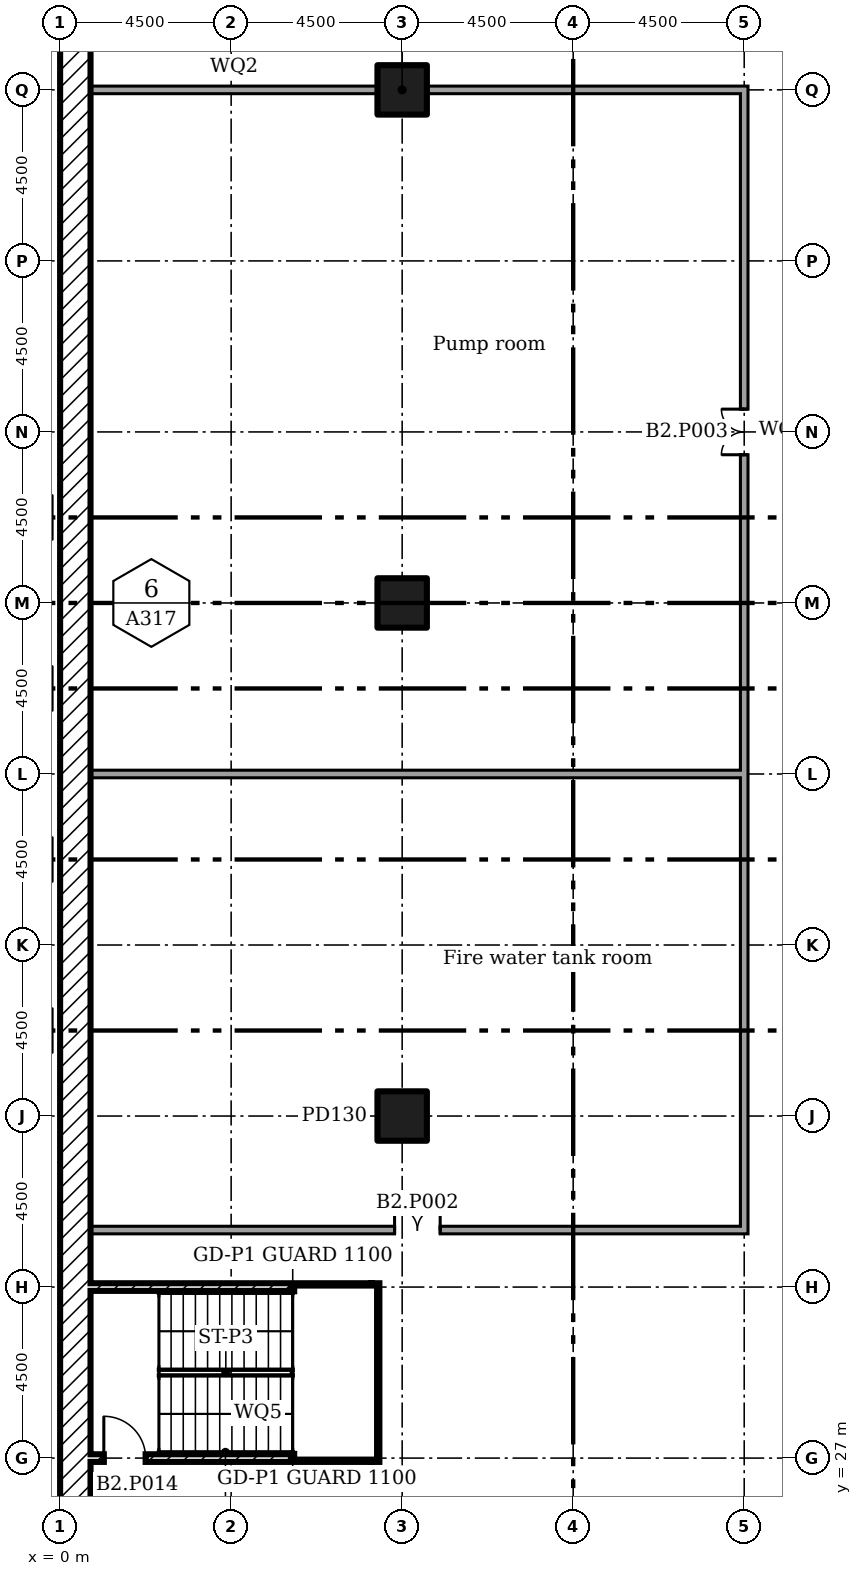
"""IFC4 building model, lengths in metres.
Left out: names, types, materials, properties, quantities, classifications, styles, units other than length and angle.
Written with IfcOpenShell. Run it as: python <this file> out.ifc"""

import sys

from ifc_helpers import new_model, si_unit, direction, frame, frame_2d, origin, origin_2d, place, context, subcontext, project, spatial, rectangle, extrude, element, fill, save


model = new_model("IFC4")
c1 = context("Model", 3, precision=1e-05, world=origin(), true_north=direction((0.0, 1.0)))
c2 = subcontext(c1, "Body", "Model", "MODEL_VIEW")
j1 = project(units=[si_unit("LENGTHUNIT", "METRE"), si_unit("PLANEANGLEUNIT", "RADIAN")], contexts=[c1])
p1 = place(None, origin())
s1 = spatial("IfcSite", under=j1, at=p1, CompositionType="ELEMENT")
p2 = place(p1, origin())
s2 = spatial("IfcBuilding", under=s1, at=p2, CompositionType="ELEMENT")
p3 = place(p2, frame((0.0, 0.0, -8.0)))
s3 = spatial("IfcBuildingStorey", under=s2, at=p3, CompositionType="ELEMENT", Elevation=-8.0)
for number, where in (
    (1, (9.0, 36.0, 0.0)),
    (2, (9.0, 49.5, 0.0)),
    (3, (9.0, 63.0, 0.0)),
):
    element("IfcColumn", number, at=place(p3, frame(where)), inside=s3, PredefinedType="COLUMN", context=c2, shape_type="SweptSolid", body=[
        extrude(rectangle(XDim=1.3, YDim=1.3, at=origin_2d()), origin(), (0.0, 0.0, 1.0), 4.0),
    ])
p4 = place(p3, frame((0.4, 0.8, 0.0), z_axis=(0.0, 0.0, 1.0), x_axis=(0.0, 1.0, 0.0)))
e4 = element("IfcWall", 4, at=p4, inside=s3, PredefinedType="SOLIDWALL", context=c2, shape_type="SweptSolid", body=[
    extrude(rectangle(XDim=97.4, YDim=0.8, at=frame_2d((48.7, 0.0))), origin(), (0.0, 0.0, 1.0), 4.0),
])
p5 = place(p3, frame((0.8, 45.0, 0.0)))
e5 = element("IfcWall", 5, at=p5, inside=s3, PredefinedType="SOLIDWALL", context=c2, shape_type="SweptSolid", body=[
    extrude(rectangle(XDim=17.3, YDim=0.2, at=frame_2d((8.65, 0.0))), origin(), (0.0, 0.0, 1.0), 3.55),
])
p6 = place(p3, frame((18.0, 32.9, 0.0), z_axis=(0.0, 0.0, 1.0), x_axis=(0.0, 1.0, 0.0)))
e6 = element("IfcWall", 6, at=p6, inside=s3, PredefinedType="SOLIDWALL", context=c2, shape_type="SweptSolid", body=[
    extrude(rectangle(XDim=12.0, YDim=0.2, at=frame_2d((6.0, 0.0))), origin(), (0.0, 0.0, 1.0), 3.55),
])
p7 = place(p3, frame((0.8, 33.0, 0.0)))
e7 = element("IfcWall", 7, at=p7, inside=s3, PredefinedType="SOLIDWALL", context=c2, shape_type="SweptSolid", body=[
    extrude(rectangle(XDim=17.1, YDim=0.2, at=frame_2d((8.55, 0.0))), origin(), (0.0, 0.0, 1.0), 3.55),
])
p8 = place(p7, frame((8.0, 0.0, 0.0)))
e8 = element("IfcOpeningElement", 8, at=p8, cuts=e7, PredefinedType="OPENING", context=c2, shape_type="SweptSolid", body=[
    extrude(rectangle(XDim=1.2, YDim=2.1, at=frame_2d((0.6, 1.05))), frame((0.0, 0.11, 0.0), z_axis=(0.0, -1.0, 0.0), x_axis=(1.0, 0.0, 0.0)), (0.0, 0.0, 1.0), 0.22),
])
p9 = place(p3, frame((18.0, 45.0, 0.0), z_axis=(0.0, 0.0, 1.0), x_axis=(0.0, 1.0, 0.0)))
e9 = element("IfcWall", 9, at=p9, inside=s3, PredefinedType="SOLIDWALL", context=c2, shape_type="SweptSolid", body=[
    extrude(rectangle(XDim=18.1, YDim=0.2, at=frame_2d((9.05, 0.0))), origin(), (0.0, 0.0, 1.0), 3.55),
])
p10 = place(p9, frame((8.4, 0.0, 0.0)))
e10 = element("IfcOpeningElement", 10, at=p10, cuts=e9, PredefinedType="OPENING", context=c2, shape_type="SweptSolid", body=[
    extrude(rectangle(XDim=1.2, YDim=2.1, at=frame_2d((0.6, 1.05))), frame((0.0, 0.11, 0.0), z_axis=(0.0, -1.0, 0.0), x_axis=(1.0, 0.0, 0.0)), (0.0, 0.0, 1.0), 0.22),
])
p11 = place(p3, frame((0.8, 63.0, 0.0)))
e11 = element("IfcWall", 11, at=p11, inside=s3, PredefinedType="SOLIDWALL", context=c2, shape_type="SweptSolid", body=[
    extrude(rectangle(XDim=7.555, YDim=0.2, at=frame_2d((3.777, 0.0))), origin(), (0.0, 0.0, 1.0), 3.55),
])
p12 = place(p3, frame((9.645, 63.0, 0.0)))
e12 = element("IfcWall", 12, at=p12, inside=s3, PredefinedType="SOLIDWALL", context=c2, shape_type="SweptSolid", body=[
    extrude(rectangle(XDim=8.255, YDim=0.2, at=frame_2d((4.127, 0.0))), origin(), (0.0, 0.0, 1.0), 3.55),
])
p13 = place(p3, frame((8.3, 26.9, 0.0), z_axis=(0.0, 0.0, 1.0), x_axis=(0.0, 1.0, 0.0)))
e13 = element("IfcWall", 13, at=p13, inside=s3, PredefinedType="SOLIDWALL", context=c2, shape_type="SweptSolid", body=[
    extrude(rectangle(XDim=4.7, YDim=0.2, at=frame_2d((2.35, 0.0))), origin(), (0.0, 0.0, 1.0), 3.55),
])
p14 = place(p3, frame((0.8, 27.0, 0.0)))
e14 = element("IfcWall", 14, at=p14, inside=s3, PredefinedType="SOLIDWALL", context=c2, shape_type="SweptSolid", body=[
    extrude(rectangle(XDim=7.4, YDim=0.2, at=frame_2d((3.7, 0.0))), origin(), (0.0, 0.0, 1.0), 3.55),
])
p15 = place(p14, frame((0.35, 0.0, 0.0)))
e15 = element("IfcOpeningElement", 15, at=p15, cuts=e14, PredefinedType="OPENING", context=c2, shape_type="SweptSolid", body=[
    extrude(rectangle(XDim=1.1, YDim=2.1, at=frame_2d((0.55, 1.05))), frame((0.0, 0.11, 0.0), z_axis=(0.0, -1.0, 0.0), x_axis=(1.0, 0.0, 0.0)), (0.0, 0.0, 1.0), 0.22),
])
p16 = place(p3, frame((0.8, 31.5, 0.0)))
e16 = element("IfcWall", 16, at=p16, inside=s3, PredefinedType="SOLIDWALL", context=c2, shape_type="SweptSolid", body=[
    extrude(rectangle(XDim=7.4, YDim=0.2, at=frame_2d((3.7, 0.0))), origin(), (0.0, 0.0, 1.0), 3.55),
])
for number, where, z_axis, x_axis in (
    (17, (6.22, 31.4, 0.0), (0.0, 0.0, 1.0), (0.0, -1.0, 0.0)),
    (18, (7.6, 31.4, 0.0), (0.0, 0.0, 1.0), (0.0, -1.0, 0.0)),
):
    element("IfcWall", number, at=place(p3, frame(where, z_axis=z_axis, x_axis=x_axis)), inside=s3, PredefinedType="SOLIDWALL", context=c2, shape_type="SweptSolid", body=[
        extrude(rectangle(XDim=4.3, YDim=0.2, at=frame_2d((2.15, 0.0))), origin(), (0.0, 0.0, 1.0), 1.8),
    ])
p17 = place(p8, origin())
e19 = element("IfcDoor", 19, at=p17, inside=s3, OperationType="DOUBLE_DOOR_SINGLE_SWING", PredefinedType="DOOR", context=c2, shape_type="SweptSolid", body=[
    extrude(rectangle(XDim=1.2, YDim=2.1, at=frame_2d((0.6, 1.05))), frame((0.0, 0.025, 0.0), z_axis=(0.0, -1.0, 0.0), x_axis=(1.0, 0.0, 0.0)), (0.0, 0.0, 1.0), 0.05),
])
fill(e8, e19)
p18 = place(p10, origin())
e20 = element("IfcDoor", 20, at=p18, inside=s3, OperationType="DOUBLE_DOOR_SINGLE_SWING", PredefinedType="DOOR", context=c2, shape_type="SweptSolid", body=[
    extrude(rectangle(XDim=1.2, YDim=2.1, at=frame_2d((0.6, 1.05))), frame((0.0, 0.025, 0.0), z_axis=(0.0, -1.0, 0.0), x_axis=(1.0, 0.0, 0.0)), (0.0, 0.0, 1.0), 0.05),
])
fill(e10, e20)
p19 = place(p15, origin())
e21 = element("IfcDoor", 21, at=p19, inside=s3, OperationType="SINGLE_SWING_RIGHT", PredefinedType="DOOR", context=c2, shape_type="SweptSolid", body=[
    extrude(rectangle(XDim=1.1, YDim=2.1, at=frame_2d((0.55, 1.05))), frame((0.0, 0.025, 0.0), z_axis=(0.0, -1.0, 0.0), x_axis=(1.0, 0.0, 0.0)), (0.0, 0.0, 1.0), 0.05),
])
fill(e15, e21)
save(model, sys.argv[1])
